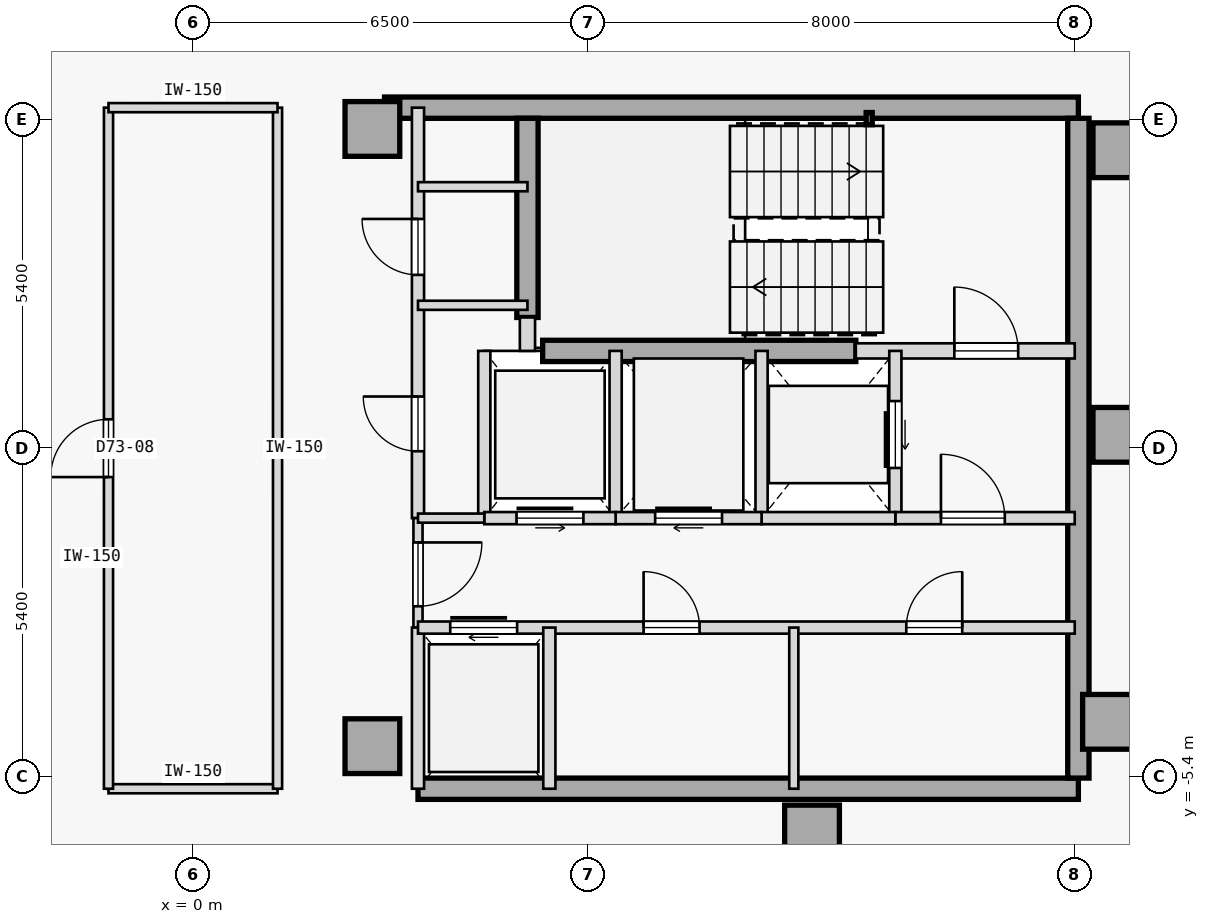
"""IFC4 building model, lengths in metres.
Left out: names, types, materials, properties, quantities, classifications, styles, units other than length and angle.
Written with IfcOpenShell. Run it as: python <this file> out.ifc"""

import sys

from ifc_helpers import new_model, si_unit, direction, frame, frame_2d, origin, origin_2d, place, context, subcontext, project, spatial, rectangle, hollow_rectangle, extrude, element, fill, save


model = new_model("IFC4")
c1 = context("Model", 3, precision=1e-05, world=origin(), true_north=direction((0.0, 1.0)))
c2 = subcontext(c1, "Body", "Model", "MODEL_VIEW")
j1 = project(units=[si_unit("LENGTHUNIT", "METRE"), si_unit("PLANEANGLEUNIT", "RADIAN")], contexts=[c1])
p1 = place(None, origin())
s1 = spatial("IfcSite", under=j1, at=p1, CompositionType="ELEMENT")
p2 = place(p1, origin())
s2 = spatial("IfcBuilding", under=s1, at=p2, CompositionType="ELEMENT")
p3 = place(p2, frame((0.0, 0.0, 272.25)))
s3 = spatial("IfcBuildingStorey", under=s2, at=p3, CompositionType="ELEMENT", Elevation=272.25)
for number, where, z_axis, x_axis in (
    (1, (15.25, 4.9, 0.0), (0.0, 0.0, 1.0), (1.0, 0.0, 0.0)),
    (2, (15.25, 0.22, 0.0), (0.0, 0.0, 1.0), (1.0, 0.0, 0.0)),
    (3, (15.08, -4.5, 0.0), (0.0, 0.0, 1.0), (1.0, 0.0, 0.0)),
    (4, (10.18, -6.32, 0.0), (0.0, 0.0, 1.0), (1.0, 0.0, 0.0)),
    (5, (2.95, -4.9, 0.0), (0.0, 0.0, 1.0), (1.0, 0.0, 0.0)),
    (6, (2.95, 5.25, 0.0), (0.0, 0.0, 1.0), (1.0, 0.0, 0.0)),
):
    element("IfcColumn", number, at=place(p3, frame(where, z_axis=z_axis, x_axis=x_axis)), inside=s3, PredefinedType="COLUMN", context=c2, shape_type="SweptSolid", body=[
        extrude(rectangle(XDim=0.9, YDim=0.9, at=origin_2d()), origin(), (0.0, 0.0, 1.0), 3.35),
    ])
p4 = place(p3, frame((3.15, 5.6, 0.0), z_axis=(0.0, 0.0, 1.0), x_axis=(1.0, 0.0, 0.0)))
e7 = element("IfcWall", 7, at=p4, inside=s3, PredefinedType="SHEAR", context=c2, shape_type="SweptSolid", body=[
    extrude(rectangle(XDim=11.41, YDim=0.35, at=frame_2d((5.705, 0.0))), origin(), (0.0, 0.0, 1.0), 3.1),
])
p5 = place(p3, frame((3.7, -5.6, 0.0), z_axis=(0.0, 0.0, 1.0), x_axis=(1.0, 0.0, 0.0)))
e8 = element("IfcWall", 8, at=p5, inside=s3, PredefinedType="SHEAR", context=c2, shape_type="SweptSolid", body=[
    extrude(rectangle(XDim=10.86, YDim=0.35, at=frame_2d((5.43, 0.0))), origin(), (0.0, 0.0, 1.0), 3.1),
])
p6 = place(p3, frame((14.56, -5.425, 0.0), z_axis=(0.0, 0.0, 1.0), x_axis=(0.0, 1.0, 0.0)))
e9 = element("IfcWall", 9, at=p6, inside=s3, PredefinedType="SHEAR", context=c2, shape_type="SweptSolid", body=[
    extrude(rectangle(XDim=10.85, YDim=0.35, at=frame_2d((5.425, 0.0))), origin(), (0.0, 0.0, 1.0), 3.1),
])
p7 = place(p3, frame((5.5, 2.15, 0.0), z_axis=(0.0, 0.0, 1.0), x_axis=(0.0, 1.0, 0.0)))
e10 = element("IfcWall", 10, at=p7, inside=s3, PredefinedType="SHEAR", context=c2, shape_type="SweptSolid", body=[
    extrude(rectangle(XDim=3.275, YDim=0.35, at=frame_2d((1.638, 0.0))), origin(), (0.0, 0.0, 1.0), 3.1),
])
p8 = place(p3, frame((5.75, 1.6, 0.0), z_axis=(0.0, 0.0, 1.0), x_axis=(1.0, 0.0, 0.0)))
e11 = element("IfcWall", 11, at=p8, inside=s3, PredefinedType="SHEAR", context=c2, shape_type="SweptSolid", body=[
    extrude(rectangle(XDim=5.15, YDim=0.35, at=frame_2d((2.575, 0.0))), origin(), (0.0, 0.0, 1.0), 3.1),
])
p9 = place(p3, frame((11.12, 5.42, 0.0), z_axis=(0.0, 0.0, 1.0), x_axis=(1.0, 0.0, 0.0)))
e12 = element("IfcColumn", 12, at=p9, inside=s3, PredefinedType="COLUMN", context=c2, shape_type="SweptSolid", body=[
    extrude(hollow_rectangle(XDim=0.1, YDim=0.2, WallThickness=0.008, at=origin_2d()), origin(), (0.0, 0.0, 1.0), 3.35),
])
p10 = place(p3, frame((10.9, 1.6, 0.0), z_axis=(0.0, 0.0, 1.0), x_axis=(1.0, 0.0, 0.0)))
e13 = element("IfcWall", 13, at=p10, inside=s3, PredefinedType="STANDARD", context=c2, shape_type="SweptSolid", body=[
    extrude(rectangle(XDim=3.6, YDim=0.25, at=frame_2d((1.8, 0.0))), origin(), (0.0, 0.0, 1.0), 3.1),
])
p11 = place(p10, frame((1.62, 0.0, 0.0)))
e14 = element("IfcOpeningElement", 14, at=p11, cuts=e13, PredefinedType="OPENING", context=c2, shape_type="SweptSolid", body=[
    extrude(rectangle(XDim=1.05, YDim=2.15, at=frame_2d((0.525, 1.075))), frame((0.0, 0.135, 0.0), z_axis=(0.0, -1.0, 0.0), x_axis=(1.0, 0.0, 0.0)), (0.0, 0.0, 1.0), 0.27),
])
p12 = place(p3, frame((5.5, 1.6, 0.0), z_axis=(0.0, 0.0, 1.0), x_axis=(0.0, 1.0, 0.0)))
e15 = element("IfcWall", 15, at=p12, inside=s3, PredefinedType="STANDARD", context=c2, shape_type="SweptSolid", body=[
    extrude(rectangle(XDim=0.55, YDim=0.25, at=frame_2d((0.275, 0.0))), origin(), (0.0, 0.0, 1.0), 3.1),
])
p13 = place(p3, frame((3.7, -1.15, 0.0), z_axis=(0.0, 0.0, 1.0), x_axis=(0.0, 1.0, 0.0)))
e16 = element("IfcWall", 16, at=p13, inside=s3, PredefinedType="STANDARD", context=c2, shape_type="SweptSolid", body=[
    extrude(rectangle(XDim=6.75, YDim=0.2, at=frame_2d((3.375, 0.0))), origin(), (0.0, 0.0, 1.0), 3.1),
])
p14 = place(p13, frame((1.1, 0.0, 0.0)))
e17 = element("IfcOpeningElement", 17, at=p14, cuts=e16, PredefinedType="OPENING", context=c2, shape_type="SweptSolid", body=[
    extrude(rectangle(XDim=0.9, YDim=2.15, at=frame_2d((0.45, 1.075))), frame((0.0, 0.11, 0.0), z_axis=(0.0, -1.0, 0.0), x_axis=(1.0, 0.0, 0.0)), (0.0, 0.0, 1.0), 0.22),
])
p15 = place(p13, frame((4.0, 0.0, 0.0)))
e18 = element("IfcOpeningElement", 18, at=p15, cuts=e16, PredefinedType="OPENING", context=c2, shape_type="SweptSolid", body=[
    extrude(rectangle(XDim=0.92, YDim=2.15, at=frame_2d((0.46, 1.075))), frame((0.0, 0.11, 0.0), z_axis=(0.0, -1.0, 0.0), x_axis=(1.0, 0.0, 0.0)), (0.0, 0.0, 1.0), 0.22),
])
p16 = place(p3, frame((3.7, -2.95, 0.0), z_axis=(0.0, 0.0, 1.0), x_axis=(0.0, 1.0, 0.0)))
e19 = element("IfcWall", 19, at=p16, inside=s3, PredefinedType="PARTITIONING", context=c2, shape_type="SweptSolid", body=[
    extrude(rectangle(XDim=1.8, YDim=0.15, at=frame_2d((0.9, 0.0))), origin(), (0.0, 0.0, 1.0), 3.1),
])
p17 = place(p16, frame((0.35, 0.0, 0.0)))
e20 = element("IfcOpeningElement", 20, at=p17, cuts=e19, PredefinedType="OPENING", context=c2, shape_type="SweptSolid", body=[
    extrude(rectangle(XDim=1.05, YDim=2.18, at=frame_2d((0.525, 1.09))), frame((0.0, 0.085, 0.0), z_axis=(0.0, -1.0, 0.0), x_axis=(1.0, 0.0, 0.0)), (0.0, 0.0, 1.0), 0.17),
])
p18 = place(p3, frame((3.7, -5.6, 0.0), z_axis=(0.0, 0.0, 1.0), x_axis=(0.0, 1.0, 0.0)))
e21 = element("IfcWall", 21, at=p18, inside=s3, PredefinedType="STANDARD", context=c2, shape_type="SweptSolid", body=[
    extrude(rectangle(XDim=2.65, YDim=0.2, at=frame_2d((1.325, 0.0))), origin(), (0.0, 0.0, 1.0), 3.1),
])
p19 = place(p3, frame((11.55, -1.15, 0.0), z_axis=(0.0, 0.0, 1.0), x_axis=(0.0, 1.0, 0.0)))
e22 = element("IfcWall", 22, at=p19, inside=s3, PredefinedType="STANDARD", context=c2, shape_type="SweptSolid", body=[
    extrude(rectangle(XDim=2.75, YDim=0.2, at=frame_2d((1.375, 0.0))), origin(), (0.0, 0.0, 1.0), 3.1),
])
p20 = place(p19, frame((0.825, 0.0, 0.0)))
e23 = element("IfcOpeningElement", 23, at=p20, cuts=e22, PredefinedType="OPENING", context=c2, shape_type="SweptSolid", body=[
    extrude(rectangle(XDim=1.1, YDim=2.15, at=frame_2d((0.55, 1.075))), frame((0.0, 0.11, 0.0), z_axis=(0.0, -1.0, 0.0), x_axis=(1.0, 0.0, 0.0)), (0.0, 0.0, 1.0), 0.22),
])
p21 = place(p3, frame((9.35, -1.15, 0.0), z_axis=(0.0, 0.0, 1.0), x_axis=(0.0, 1.0, 0.0)))
e24 = element("IfcWall", 24, at=p21, inside=s3, PredefinedType="STANDARD", context=c2, shape_type="SweptSolid", body=[
    extrude(rectangle(XDim=2.75, YDim=0.2, at=frame_2d((1.375, 0.0))), origin(), (0.0, 0.0, 1.0), 3.1),
])
p22 = place(p3, frame((11.55, -1.15, 0.0), z_axis=(0.0, 0.0, 1.0), x_axis=(1.0, 0.0, 0.0)))
e25 = element("IfcWall", 25, at=p22, inside=s3, PredefinedType="STANDARD", context=c2, shape_type="SweptSolid", body=[
    extrude(rectangle(XDim=2.95, YDim=0.2, at=frame_2d((1.475, 0.0))), origin(), (0.0, 0.0, 1.0), 3.1),
])
p23 = place(p22, frame((0.75, 0.0, 0.0)))
e26 = element("IfcOpeningElement", 26, at=p23, cuts=e25, PredefinedType="OPENING", context=c2, shape_type="SweptSolid", body=[
    extrude(rectangle(XDim=1.05, YDim=2.18, at=frame_2d((0.525, 1.09))), frame((0.0, 0.11, 0.0), z_axis=(0.0, -1.0, 0.0), x_axis=(1.0, 0.0, 0.0)), (0.0, 0.0, 1.0), 0.22),
])
p24 = place(p3, frame((9.35, -1.15, 0.0), z_axis=(0.0, 0.0, 1.0), x_axis=(1.0, 0.0, 0.0)))
e27 = element("IfcWall", 27, at=p24, inside=s3, PredefinedType="STANDARD", context=c2, shape_type="SweptSolid", body=[
    extrude(rectangle(XDim=2.2, YDim=0.2, at=frame_2d((1.1, 0.0))), origin(), (0.0, 0.0, 1.0), 3.1),
])
p25 = place(p3, frame((6.95, -1.15, 0.0), z_axis=(0.0, 0.0, 1.0), x_axis=(0.0, 1.0, 0.0)))
e28 = element("IfcWall", 28, at=p25, inside=s3, PredefinedType="STANDARD", context=c2, shape_type="SweptSolid", body=[
    extrude(rectangle(XDim=2.75, YDim=0.2, at=frame_2d((1.375, 0.0))), origin(), (0.0, 0.0, 1.0), 3.1),
])
p26 = place(p3, frame((6.95, -1.15, 0.0), z_axis=(0.0, 0.0, 1.0), x_axis=(1.0, 0.0, 0.0)))
e29 = element("IfcWall", 29, at=p26, inside=s3, PredefinedType="STANDARD", context=c2, shape_type="SweptSolid", body=[
    extrude(rectangle(XDim=2.4, YDim=0.2, at=frame_2d((1.2, 0.0))), origin(), (0.0, 0.0, 1.0), 3.1),
])
p27 = place(p26, frame((0.65, 0.0, 0.0)))
e30 = element("IfcOpeningElement", 30, at=p27, cuts=e29, PredefinedType="OPENING", context=c2, shape_type="SweptSolid", body=[
    extrude(rectangle(XDim=1.1, YDim=2.15, at=frame_2d((0.55, 1.075))), frame((0.0, 0.11, 0.0), z_axis=(0.0, -1.0, 0.0), x_axis=(1.0, 0.0, 0.0)), (0.0, 0.0, 1.0), 0.22),
])
p28 = place(p3, frame((4.79, -1.15, 0.0), z_axis=(0.0, 0.0, 1.0), x_axis=(0.0, 1.0, 0.0)))
e31 = element("IfcWall", 31, at=p28, inside=s3, PredefinedType="STANDARD", context=c2, shape_type="SweptSolid", body=[
    extrude(rectangle(XDim=2.75, YDim=0.2, at=frame_2d((1.375, 0.0))), origin(), (0.0, 0.0, 1.0), 3.1),
])
p29 = place(p3, frame((4.79, -1.15, 0.0), z_axis=(0.0, 0.0, 1.0), x_axis=(1.0, 0.0, 0.0)))
e32 = element("IfcWall", 32, at=p29, inside=s3, PredefinedType="STANDARD", context=c2, shape_type="SweptSolid", body=[
    extrude(rectangle(XDim=2.16, YDim=0.2, at=frame_2d((1.08, 0.0))), origin(), (0.0, 0.0, 1.0), 3.1),
])
p30 = place(p29, frame((0.53, 0.0, 0.0)))
e33 = element("IfcOpeningElement", 33, at=p30, cuts=e32, PredefinedType="OPENING", context=c2, shape_type="SweptSolid", body=[
    extrude(rectangle(XDim=1.1, YDim=2.15, at=frame_2d((0.55, 1.075))), frame((0.0, 0.11, 0.0), z_axis=(0.0, -1.0, 0.0), x_axis=(1.0, 0.0, 0.0)), (0.0, 0.0, 1.0), 0.22),
])
p31 = place(p3, frame((3.7, -1.15, 0.0), z_axis=(0.0, 0.0, 1.0), x_axis=(1.0, 0.0, 0.0)))
e34 = element("IfcWall", 34, at=p31, inside=s3, PredefinedType="PARTITIONING", context=c2, shape_type="SweptSolid", body=[
    extrude(rectangle(XDim=1.09, YDim=0.15, at=frame_2d((0.545, 0.0))), origin(), (0.0, 0.0, 1.0), 3.1),
])
p32 = place(p3, frame((3.7, -2.95, 0.0), z_axis=(0.0, 0.0, 1.0), x_axis=(1.0, 0.0, 0.0)))
e35 = element("IfcWall", 35, at=p32, inside=s3, PredefinedType="STANDARD", context=c2, shape_type="SweptSolid", body=[
    extrude(rectangle(XDim=10.8, YDim=0.2, at=frame_2d((5.4, 0.0))), origin(), (0.0, 0.0, 1.0), 3.1),
])
p33 = place(p32, frame((0.53, 0.0, 0.0)))
e36 = element("IfcOpeningElement", 36, at=p33, cuts=e35, PredefinedType="OPENING", context=c2, shape_type="SweptSolid", body=[
    extrude(rectangle(XDim=1.1, YDim=2.15, at=frame_2d((0.55, 1.075))), frame((0.0, 0.11, 0.0), z_axis=(0.0, -1.0, 0.0), x_axis=(1.0, 0.0, 0.0)), (0.0, 0.0, 1.0), 0.22),
])
p34 = place(p32, frame((3.71, 0.0, 0.0)))
e37 = element("IfcOpeningElement", 37, at=p34, cuts=e35, PredefinedType="OPENING", context=c2, shape_type="SweptSolid", body=[
    extrude(rectangle(XDim=0.92, YDim=2.15, at=frame_2d((0.46, 1.075))), frame((0.0, 0.11, 0.0), z_axis=(0.0, -1.0, 0.0), x_axis=(1.0, 0.0, 0.0)), (0.0, 0.0, 1.0), 0.22),
])
p35 = place(p32, frame((8.03, 0.0, 0.0)))
e38 = element("IfcOpeningElement", 38, at=p35, cuts=e35, PredefinedType="OPENING", context=c2, shape_type="SweptSolid", body=[
    extrude(rectangle(XDim=0.92, YDim=2.15, at=frame_2d((0.46, 1.075))), frame((0.0, 0.11, 0.0), z_axis=(0.0, -1.0, 0.0), x_axis=(1.0, 0.0, 0.0)), (0.0, 0.0, 1.0), 0.22),
])
p36 = place(p3, frame((5.86, -5.6, 0.0), z_axis=(0.0, 0.0, 1.0), x_axis=(0.0, 1.0, 0.0)))
e39 = element("IfcWall", 39, at=p36, inside=s3, PredefinedType="STANDARD", context=c2, shape_type="SweptSolid", body=[
    extrude(rectangle(XDim=2.65, YDim=0.2, at=frame_2d((1.325, 0.0))), origin(), (0.0, 0.0, 1.0), 3.1),
])
p37 = place(p3, frame((9.88, -5.6, 0.0), z_axis=(0.0, 0.0, 1.0), x_axis=(0.0, 1.0, 0.0)))
e40 = element("IfcWall", 40, at=p37, inside=s3, PredefinedType="PARTITIONING", context=c2, shape_type="SweptSolid", body=[
    extrude(rectangle(XDim=2.65, YDim=0.15, at=frame_2d((1.325, 0.0))), origin(), (0.0, 0.0, 1.0), 3.1),
])
for number, where, z_axis, x_axis in (
    (41, (3.7, 4.3, 0.0), (0.0, 0.0, 1.0), (1.0, 0.0, 0.0)),
    (42, (3.7, 2.35, 0.0), (0.0, 0.0, 1.0), (1.0, 0.0, 0.0)),
):
    element("IfcWall", number, at=place(p3, frame(where, z_axis=z_axis, x_axis=x_axis)), inside=s3, PredefinedType="PARTITIONING", context=c2, shape_type="SweptSolid", body=[
        extrude(rectangle(XDim=1.8, YDim=0.15, at=frame_2d((0.9, 0.0))), origin(), (0.0, 0.0, 1.0), 3.1),
    ])
p38 = place(p3, frame((-1.39, -5.6, 0.0), z_axis=(0.0, 0.0, 1.0), x_axis=(0.999999996145, -8.7811731e-05, 0.0)))
e43 = element("IfcWall", 43, at=p38, inside=s3, PredefinedType="PARTITIONING", context=c2, shape_type="SweptSolid", body=[
    extrude(rectangle(XDim=2.78, YDim=0.15, at=frame_2d((1.39, 0.0))), origin(), (0.0, 0.0, 1.0), 3.1),
])
p39 = place(p3, frame((-1.39, -5.6, 0.0), z_axis=(0.0, 0.0, 1.0), x_axis=(2.1797415e-05, 0.999999999762, 0.0)))
e44 = element("IfcWall", 44, at=p39, inside=s3, PredefinedType="PARTITIONING", context=c2, shape_type="SweptSolid", body=[
    extrude(rectangle(XDim=11.2, YDim=0.15, at=frame_2d((5.6, 0.0))), origin(), (0.0, 0.0, 1.0), 3.1),
])
p40 = place(p39, frame((5.125, 0.0, 0.0)))
e45 = element("IfcOpeningElement", 45, at=p40, cuts=e44, PredefinedType="OPENING", context=c2, shape_type="SweptSolid", body=[
    extrude(rectangle(XDim=0.95, YDim=2.15, at=frame_2d((0.475, 1.075))), frame((0.0, 0.085, 0.0), z_axis=(0.0, -1.0, 0.0), x_axis=(1.0, 0.0, 0.0)), (0.0, 0.0, 1.0), 0.17),
])
p41 = place(p3, frame((1.39, -5.6, 0.0), z_axis=(0.0, 0.0, 1.0), x_axis=(-4.359578e-05, 0.99999999905, 0.0)))
e46 = element("IfcWall", 46, at=p41, inside=s3, PredefinedType="PARTITIONING", context=c2, shape_type="SweptSolid", body=[
    extrude(rectangle(XDim=11.2, YDim=0.15, at=frame_2d((5.6, 0.0))), origin(), (0.0, 0.0, 1.0), 3.1),
])
p42 = place(p3, frame((-1.39, 5.6, 0.0), z_axis=(0.0, 0.0, 1.0), x_axis=(0.99999998457, -0.000175669738, 0.0)))
e47 = element("IfcWall", 47, at=p42, inside=s3, PredefinedType="PARTITIONING", context=c2, shape_type="SweptSolid", body=[
    extrude(rectangle(XDim=2.78, YDim=0.15, at=frame_2d((1.39, 0.0))), origin(), (0.0, 0.0, 1.0), 3.1),
])
p43 = place(p3, frame((17.047, 5.052, 0.0), z_axis=(0.0, 0.0, 1.0), x_axis=(-0.406752543172, 0.913538378298, 0.0)))
e48 = element("IfcWall", 48, at=p43, inside=s3, PredefinedType="PARTITIONING", context=c2, shape_type="SweptSolid", body=[
    extrude(rectangle(XDim=7.561, YDim=0.15, at=frame_2d((3.781, 0.0))), origin(), (0.0, 0.0, 1.0), 3.1),
])
p44 = place(p11, origin())
e49 = element("IfcDoor", 49, at=p44, inside=s3, OperationType="SINGLE_SWING_LEFT", PredefinedType="DOOR", context=c2, shape_type="SweptSolid", body=[
    extrude(rectangle(XDim=1.05, YDim=2.15, at=frame_2d((0.525, 1.075))), frame((0.0, 0.025, 0.0), z_axis=(0.0, -1.0, 0.0), x_axis=(1.0, 0.0, 0.0)), (0.0, 0.0, 1.0), 0.05),
])
fill(e14, e49)
p45 = place(p23, origin())
e50 = element("IfcDoor", 50, at=p45, inside=s3, OperationType="SINGLE_SWING_LEFT", PredefinedType="DOOR", context=c2, shape_type="SweptSolid", body=[
    extrude(rectangle(XDim=1.05, YDim=2.18, at=frame_2d((0.525, 1.09))), frame((0.0, 0.025, 0.0), z_axis=(0.0, -1.0, 0.0), x_axis=(1.0, 0.0, 0.0)), (0.0, 0.0, 1.0), 0.05),
])
fill(e26, e50)
p46 = place(p17, frame((1.05, 0.0, 0.0), z_axis=(0.0, 0.0, 1.0), x_axis=(-1.0, 0.0, 0.0)))
e51 = element("IfcDoor", 51, at=p46, inside=s3, OperationType="SINGLE_SWING_RIGHT", PredefinedType="DOOR", context=c2, shape_type="SweptSolid", body=[
    extrude(rectangle(XDim=1.05, YDim=2.18, at=frame_2d((0.525, 1.09))), frame((0.0, 0.025, 0.0), z_axis=(0.0, -1.0, 0.0), x_axis=(1.0, 0.0, 0.0)), (0.0, 0.0, 1.0), 0.05),
])
fill(e20, e51)
p47 = place(p20, origin())
e52 = element("IfcDoor", 52, at=p47, inside=s3, OperationType="SLIDING_TO_RIGHT", PredefinedType="DOOR", context=c2, shape_type="SweptSolid", body=[
    extrude(rectangle(XDim=1.1, YDim=2.15, at=frame_2d((0.55, 1.075))), frame((0.0, 0.025, 0.0), z_axis=(0.0, -1.0, 0.0), x_axis=(1.0, 0.0, 0.0)), (0.0, 0.0, 1.0), 0.05),
])
fill(e23, e52)
p48 = place(p27, origin())
e53 = element("IfcDoor", 53, at=p48, inside=s3, OperationType="SLIDING_TO_RIGHT", PredefinedType="DOOR", context=c2, shape_type="SweptSolid", body=[
    extrude(rectangle(XDim=1.1, YDim=2.15, at=frame_2d((0.55, 1.075))), frame((0.0, 0.025, 0.0), z_axis=(0.0, -1.0, 0.0), x_axis=(1.0, 0.0, 0.0)), (0.0, 0.0, 1.0), 0.05),
])
fill(e30, e53)
p49 = place(p30, origin())
e54 = element("IfcDoor", 54, at=p49, inside=s3, OperationType="SLIDING_TO_LEFT", PredefinedType="DOOR", context=c2, shape_type="SweptSolid", body=[
    extrude(rectangle(XDim=1.1, YDim=2.15, at=frame_2d((0.55, 1.075))), frame((0.0, 0.025, 0.0), z_axis=(0.0, -1.0, 0.0), x_axis=(1.0, 0.0, 0.0)), (0.0, 0.0, 1.0), 0.05),
])
fill(e33, e54)
p50 = place(p33, origin())
e55 = element("IfcDoor", 55, at=p50, inside=s3, OperationType="SLIDING_TO_RIGHT", PredefinedType="DOOR", context=c2, shape_type="SweptSolid", body=[
    extrude(rectangle(XDim=1.1, YDim=2.15, at=frame_2d((0.55, 1.075))), frame((0.0, 0.025, 0.0), z_axis=(0.0, -1.0, 0.0), x_axis=(1.0, 0.0, 0.0)), (0.0, 0.0, 1.0), 0.05),
])
fill(e36, e55)
p51 = place(p34, origin())
e56 = element("IfcDoor", 56, at=p51, inside=s3, OperationType="SINGLE_SWING_LEFT", PredefinedType="DOOR", context=c2, shape_type="SweptSolid", body=[
    extrude(rectangle(XDim=0.92, YDim=2.15, at=frame_2d((0.46, 1.075))), frame((0.0, 0.025, 0.0), z_axis=(0.0, -1.0, 0.0), x_axis=(1.0, 0.0, 0.0)), (0.0, 0.0, 1.0), 0.05),
])
fill(e37, e56)
p52 = place(p35, origin())
e57 = element("IfcDoor", 57, at=p52, inside=s3, OperationType="SINGLE_SWING_RIGHT", PredefinedType="DOOR", context=c2, shape_type="SweptSolid", body=[
    extrude(rectangle(XDim=0.92, YDim=2.15, at=frame_2d((0.46, 1.075))), frame((0.0, 0.025, 0.0), z_axis=(0.0, -1.0, 0.0), x_axis=(1.0, 0.0, 0.0)), (0.0, 0.0, 1.0), 0.05),
])
fill(e38, e57)
p53 = place(p14, origin())
e58 = element("IfcDoor", 58, at=p53, inside=s3, OperationType="SINGLE_SWING_RIGHT", PredefinedType="DOOR", context=c2, shape_type="SweptSolid", body=[
    extrude(rectangle(XDim=0.9, YDim=2.15, at=frame_2d((0.45, 1.075))), frame((0.0, 0.025, 0.0), z_axis=(0.0, -1.0, 0.0), x_axis=(1.0, 0.0, 0.0)), (0.0, 0.0, 1.0), 0.05),
])
fill(e17, e58)
p54 = place(p15, origin())
e59 = element("IfcDoor", 59, at=p54, inside=s3, OperationType="SINGLE_SWING_RIGHT", PredefinedType="DOOR", context=c2, shape_type="SweptSolid", body=[
    extrude(rectangle(XDim=0.92, YDim=2.15, at=frame_2d((0.46, 1.075))), frame((0.0, 0.025, 0.0), z_axis=(0.0, -1.0, 0.0), x_axis=(1.0, 0.0, 0.0)), (0.0, 0.0, 1.0), 0.05),
])
fill(e18, e59)
p55 = place(p40, origin())
e60 = element("IfcDoor", 60, at=p55, inside=s3, OperationType="SINGLE_SWING_LEFT", PredefinedType="DOOR", context=c2, shape_type="SweptSolid", body=[
    extrude(rectangle(XDim=0.95, YDim=2.15, at=frame_2d((0.475, 1.075))), frame((0.0, 0.025, 0.0), z_axis=(0.0, -1.0, 0.0), x_axis=(1.0, 0.0, 0.0)), (0.0, 0.0, 1.0), 0.05),
])
fill(e45, e60)
save(model, sys.argv[1])
